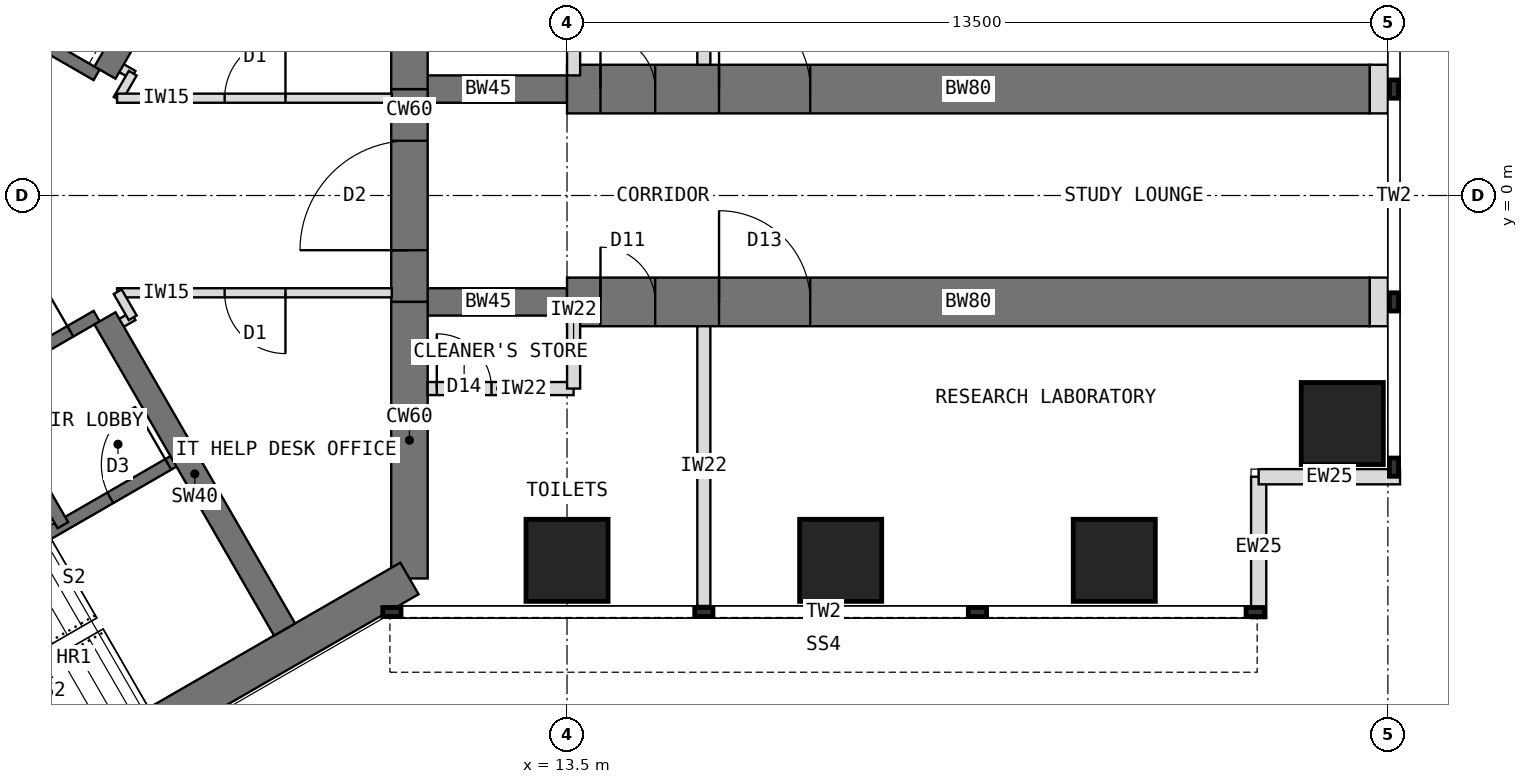
"""IFC4 building model, lengths in metres.
Left out: names, types, materials, properties, quantities, classifications, styles, units other than length and angle.
Written with IfcOpenShell. Run it as: python <this file> out.ifc"""

import sys

from ifc_helpers import new_model, si_unit, direction, frame, frame_2d, origin, origin_2d, place, context, subcontext, project, spatial, rectangle, extrude, element, fill, save


model = new_model("IFC4")
c1 = context("Model", 3, precision=1e-05, world=origin(), true_north=direction((0.0, 1.0)))
c2 = subcontext(c1, "Body", "Model", "MODEL_VIEW")
j1 = project(units=[si_unit("LENGTHUNIT", "METRE"), si_unit("PLANEANGLEUNIT", "RADIAN")], contexts=[c1])
p1 = place(None, origin())
s1 = spatial("IfcSite", under=j1, at=p1, CompositionType="ELEMENT")
p2 = place(p1, origin())
s2 = spatial("IfcBuilding", under=s1, at=p2, CompositionType="ELEMENT")
p3 = place(p2, frame((0.0, 0.0, 101.5)))
s3 = spatial("IfcBuildingStorey", under=s2, at=p3, CompositionType="ELEMENT", Elevation=101.5)
p4 = place(p3, frame((10.908, -6.298, 0.0), z_axis=(0.0, 0.0, 1.0), x_axis=(0.0, 1.0, 0.0)))
e1 = element("IfcWall", 1, at=p4, inside=s3, PredefinedType="SHEAR", context=c2, shape_type="SweptSolid", body=[
    extrude(rectangle(XDim=4.548, YDim=0.6, at=frame_2d((2.274, 0.0))), origin(), (0.0, 0.0, 1.0), 4.0),
])
p5 = place(p3, frame((10.908, -1.75, 0.0), z_axis=(0.0, 0.0, 1.0), x_axis=(0.0, 1.0, 0.0)))
e2 = element("IfcWall", 2, at=p5, inside=s3, PredefinedType="SHEAR", context=c2, shape_type="SweptSolid", body=[
    extrude(rectangle(XDim=3.5, YDim=0.6, at=frame_2d((1.75, 0.0))), origin(), (0.0, 0.0, 1.0), 4.0),
])
p6 = place(p5, frame((0.85, 0.0, 0.0)))
e3 = element("IfcOpeningElement", 3, at=p6, cuts=e2, PredefinedType="OPENING", context=c2, shape_type="SweptSolid", body=[
    extrude(rectangle(XDim=1.8, YDim=2.1, at=frame_2d((0.9, 1.05))), frame((0.0, 0.31, 0.0), z_axis=(0.0, -1.0, 0.0), x_axis=(1.0, 0.0, 0.0)), (0.0, 0.0, 1.0), 0.62),
])
p7 = place(p3, frame((10.908, 1.75, 0.0), z_axis=(0.0, 0.0, 1.0), x_axis=(0.0, 1.0, 0.0)))
e4 = element("IfcWall", 4, at=p7, inside=s3, PredefinedType="SHEAR", context=c2, shape_type="SweptSolid", body=[
    extrude(rectangle(XDim=4.548, YDim=0.6, at=frame_2d((2.274, 0.0))), origin(), (0.0, 0.0, 1.0), 4.0),
])
p8 = place(p3, frame((0.0, -12.596, 0.0), z_axis=(0.0, 0.0, 1.0), x_axis=(0.866021940709, 0.500005998175, 0.0)))
e5 = element("IfcWall", 5, at=p8, inside=s3, PredefinedType="SHEAR", context=c2, shape_type="SweptSolid", body=[
    extrude(rectangle(XDim=12.596, YDim=0.6, at=frame_2d((6.298, 0.0))), origin(), (0.0, 0.0, 1.0), 4.0),
])
p9 = place(p3, frame((10.908, 1.75, 0.0), z_axis=(0.0, 0.0, 1.0), x_axis=(1.0, 0.0, 0.0)))
e6 = element("IfcWall", 6, at=p9, inside=s3, PredefinedType="SHEAR", context=c2, shape_type="SweptSolid", body=[
    extrude(rectangle(XDim=2.592, YDim=0.45, at=frame_2d((1.296, 0.0))), origin(), (0.0, 0.0, 1.0), 4.0),
])
p10 = place(p3, frame((13.5, 1.75, 0.0), z_axis=(0.0, 0.0, 1.0), x_axis=(1.0, 0.0, 0.0)))
e7 = element("IfcWall", 7, at=p10, inside=s3, PredefinedType="SHEAR", context=c2, shape_type="SweptSolid", body=[
    extrude(rectangle(XDim=13.2, YDim=0.8, at=frame_2d((6.6, 0.0))), origin(), (0.0, 0.0, 1.0), 4.0),
])
p11 = place(p10, frame((0.55, 0.0, 0.0)))
e8 = element("IfcOpeningElement", 8, at=p11, cuts=e7, PredefinedType="OPENING", context=c2, shape_type="SweptSolid", body=[
    extrude(rectangle(XDim=0.9, YDim=2.1, at=frame_2d((0.45, 1.05))), frame((0.0, 0.41, 0.0), z_axis=(0.0, -1.0, 0.0), x_axis=(1.0, 0.0, 0.0)), (0.0, 0.0, 1.0), 0.82),
])
p12 = place(p10, frame((2.5, 0.0, 0.0)))
e9 = element("IfcOpeningElement", 9, at=p12, cuts=e7, PredefinedType="OPENING", context=c2, shape_type="SweptSolid", body=[
    extrude(rectangle(XDim=1.5, YDim=2.1, at=frame_2d((0.75, 1.05))), frame((0.0, 0.41, 0.0), z_axis=(0.0, -1.0, 0.0), x_axis=(1.0, 0.0, 0.0)), (0.0, 0.0, 1.0), 0.82),
])
p13 = place(p3, frame((10.908, -1.75, 0.0), z_axis=(0.0, 0.0, 1.0), x_axis=(1.0, 0.0, 0.0)))
e10 = element("IfcWall", 10, at=p13, inside=s3, PredefinedType="SHEAR", context=c2, shape_type="SweptSolid", body=[
    extrude(rectangle(XDim=2.592, YDim=0.45, at=frame_2d((1.296, 0.0))), origin(), (0.0, 0.0, 1.0), 4.0),
])
p14 = place(p3, frame((13.5, -1.75, 0.0), z_axis=(0.0, 0.0, 1.0), x_axis=(1.0, 0.0, 0.0)))
e11 = element("IfcWall", 11, at=p14, inside=s3, PredefinedType="SHEAR", context=c2, shape_type="SweptSolid", body=[
    extrude(rectangle(XDim=13.2, YDim=0.8, at=frame_2d((6.6, 0.0))), origin(), (0.0, 0.0, 1.0), 4.0),
])
p15 = place(p14, frame((0.55, 0.0, 0.0)))
e12 = element("IfcOpeningElement", 12, at=p15, cuts=e11, PredefinedType="OPENING", context=c2, shape_type="SweptSolid", body=[
    extrude(rectangle(XDim=0.9, YDim=2.1, at=frame_2d((0.45, 1.05))), frame((0.0, 0.41, 0.0), z_axis=(0.0, -1.0, 0.0), x_axis=(1.0, 0.0, 0.0)), (0.0, 0.0, 1.0), 0.82),
])
p16 = place(p14, frame((2.5, 0.0, 0.0)))
e13 = element("IfcOpeningElement", 13, at=p16, cuts=e11, PredefinedType="OPENING", context=c2, shape_type="SweptSolid", body=[
    extrude(rectangle(XDim=1.5, YDim=2.1, at=frame_2d((0.75, 1.05))), frame((0.0, 0.41, 0.0), z_axis=(0.0, -1.0, 0.0), x_axis=(1.0, 0.0, 0.0)), (0.0, 0.0, 1.0), 0.82),
])
for number, where, z_axis, x_axis in (
    (14, (13.5, -6.0, 0.0), (0.0, 0.0, 1.0), (1.0, 0.0, 0.0)),
    (15, (18.0, -6.0, 0.0), (0.0, 0.0, 1.0), (1.0, 0.0, 0.0)),
    (16, (22.5, -6.0, 0.0), (0.0, 0.0, 1.0), (1.0, 0.0, 0.0)),
    (17, (26.25, -3.75, 0.0), (0.0, 0.0, 1.0), (1.0, 0.0, 0.0)),
):
    element("IfcColumn", number, at=place(p3, frame(where, z_axis=z_axis, x_axis=x_axis)), inside=s3, PredefinedType="COLUMN", context=c2, shape_type="SweptSolid", body=[
        extrude(rectangle(XDim=1.35, YDim=1.35, at=origin_2d()), origin(), (0.0, 0.0, 1.0), 4.0),
    ])
for number, where, z_axis, x_axis in (
    (18, (24.875, -6.95, 0.0), (0.0, 0.0, 1.0), (0.0, 1.0, 0.0)),
    (19, (24.875, -4.625, 0.0), (0.0, 0.0, 1.0), (1.0, 0.0, 0.0)),
):
    element("IfcWall", number, at=place(p3, frame(where, z_axis=z_axis, x_axis=x_axis)), inside=s3, PredefinedType="STANDARD", context=c2, shape_type="SweptSolid", body=[
        extrude(rectangle(XDim=2.325, YDim=0.25, at=frame_2d((1.163, 0.0))), origin(), (0.0, 0.0, 1.0), 3.8),
    ])
for number, where, z_axis, x_axis in (
    (20, (26.7, 1.75, 0.0), (0.0, 0.0, 1.0), (1.0, 0.0, 0.0)),
    (21, (26.7, -1.75, 0.0), (0.0, 0.0, 1.0), (1.0, 0.0, 0.0)),
):
    element("IfcWall", number, at=place(p3, frame(where, z_axis=z_axis, x_axis=x_axis)), inside=s3, PredefinedType="PARTITIONING", context=c2, shape_type="SweptSolid", body=[
        extrude(rectangle(XDim=0.3, YDim=0.8, at=frame_2d((0.15, 0.0))), origin(), (0.0, 0.0, 1.0), 3.8),
    ])
p17 = place(p3, frame((5.764, 1.984, 0.0), z_axis=(0.0, 0.0, 1.0), x_axis=(-0.866026010844, 0.49999894854, 0.0)))
e22 = element("IfcWall", 22, at=p17, inside=s3, PredefinedType="SHEAR", context=c2, shape_type="SweptSolid", body=[
    extrude(rectangle(XDim=8.0, YDim=0.2, at=frame_2d((4.0, 0.0))), origin(), (0.0, 0.0, 1.0), 4.0),
])
p18 = place(p17, frame((6.3, 0.0, 0.0)))
e23 = element("IfcOpeningElement", 23, at=p18, cuts=e22, PredefinedType="OPENING", context=c2, shape_type="SweptSolid", body=[
    extrude(rectangle(XDim=1.2, YDim=2.1, at=frame_2d((0.6, 1.05))), frame((0.0, 0.11, 0.0), z_axis=(0.0, -1.0, 0.0), x_axis=(1.0, 0.0, 0.0)), (0.0, 0.0, 1.0), 0.22),
])
p19 = place(p3, frame((5.901, 2.02, 0.0), z_axis=(0.0, 0.0, 1.0), x_axis=(0.500027676417, 0.866009424208, 0.0)))
e24 = element("IfcWall", 24, at=p19, inside=s3, PredefinedType="SHEAR", context=c2, shape_type="SweptSolid", body=[
    extrude(rectangle(XDim=5.908, YDim=0.4, at=frame_2d((2.954, 0.0))), origin(), (0.0, 0.0, 1.0), 4.0),
])
p20 = place(p3, frame((-1.164, -5.984, 0.0), z_axis=(0.0, 0.0, 1.0), x_axis=(0.866026010844, 0.49999894854, 0.0)))
e25 = element("IfcWall", 25, at=p20, inside=s3, PredefinedType="SHEAR", context=c2, shape_type="SweptSolid", body=[
    extrude(rectangle(XDim=8.0, YDim=0.2, at=frame_2d((4.0, 0.0))), origin(), (0.0, 0.0, 1.0), 4.0),
])
p21 = place(p20, frame((6.3, 0.0, 0.0)))
e26 = element("IfcOpeningElement", 26, at=p21, cuts=e25, PredefinedType="OPENING", context=c2, shape_type="SweptSolid", body=[
    extrude(rectangle(XDim=1.2, YDim=2.1, at=frame_2d((0.6, 1.05))), frame((0.0, 0.11, 0.0), z_axis=(0.0, -1.0, 0.0), x_axis=(1.0, 0.0, 0.0)), (0.0, 0.0, 1.0), 0.22),
])
p22 = place(p20, frame((0.9, 0.0, 0.0)))
e27 = element("IfcOpeningElement", 27, at=p22, cuts=e25, PredefinedType="OPENING", context=c2, shape_type="SweptSolid", body=[
    extrude(rectangle(XDim=1.1, YDim=2.2, at=frame_2d((0.55, 1.1))), frame((0.0, 0.11, 0.0), z_axis=(0.0, -1.0, 0.0), x_axis=(1.0, 0.0, 0.0)), (0.0, 0.0, 1.0), 0.22),
])
p23 = place(p20, frame((3.8, 0.0, 0.0)))
e28 = element("IfcOpeningElement", 28, at=p23, cuts=e25, PredefinedType="OPENING", context=c2, shape_type="SweptSolid", body=[
    extrude(rectangle(XDim=1.1, YDim=2.2, at=frame_2d((0.55, 1.1))), frame((0.0, 0.11, 0.0), z_axis=(0.0, -1.0, 0.0), x_axis=(1.0, 0.0, 0.0)), (0.0, 0.0, 1.0), 0.22),
])
p24 = place(p3, frame((3.909, -3.17, 0.0), z_axis=(0.0, 0.0, 1.0), x_axis=(0.49997716683, -0.86603858612, 0.0)))
e29 = element("IfcWall", 29, at=p24, inside=s3, PredefinedType="SHEAR", context=c2, shape_type="SweptSolid", body=[
    extrude(rectangle(XDim=2.6, YDim=0.2, at=frame_2d((1.3, 0.0))), origin(), (0.0, 0.0, 1.0), 4.0),
])
p25 = place(p3, frame((0.186, -8.322, 0.0), z_axis=(0.0, 0.0, 1.0), x_axis=(0.866026010844, 0.49999894854, 0.0)))
e30 = element("IfcWall", 30, at=p25, inside=s3, PredefinedType="SHEAR", context=c2, shape_type="SweptSolid", body=[
    extrude(rectangle(XDim=8.0, YDim=0.2, at=frame_2d((4.0, 0.0))), origin(), (0.0, 0.0, 1.0), 4.0),
])
p26 = place(p25, frame((6.7, 0.0, 0.0)))
e31 = element("IfcOpeningElement", 31, at=p26, cuts=e30, PredefinedType="OPENING", context=c2, shape_type="SweptSolid", body=[
    extrude(rectangle(XDim=1.1, YDim=2.1, at=frame_2d((0.55, 1.05))), frame((0.0, 0.11, 0.0), z_axis=(0.0, -1.0, 0.0), x_axis=(1.0, 0.0, 0.0)), (0.0, 0.0, 1.0), 0.22),
])
p27 = place(p3, frame((5.901, -2.02, 0.0), z_axis=(0.0, 0.0, 1.0), x_axis=(0.500027676417, -0.866009424208, 0.0)))
e32 = element("IfcWall", 32, at=p27, inside=s3, PredefinedType="SHEAR", context=c2, shape_type="SweptSolid", body=[
    extrude(rectangle(XDim=5.908, YDim=0.4, at=frame_2d((2.954, 0.0))), origin(), (0.0, 0.0, 1.0), 4.0),
])
p28 = place(p3, frame((15.75, 2.15, 0.0), z_axis=(0.0, 0.0, 1.0), x_axis=(0.0, 1.0, 0.0)))
e33 = element("IfcWall", 33, at=p28, inside=s3, PredefinedType="PARTITIONING", context=c2, shape_type="SweptSolid", body=[
    extrude(rectangle(XDim=4.6, YDim=0.215, at=frame_2d((2.3, 0.0))), origin(), (0.0, 0.0, 1.0), 3.8),
])
p29 = place(p3, frame((13.608, 1.975, 0.0), z_axis=(0.0, 0.0, 1.0), x_axis=(0.0, 1.0, 0.0)))
e34 = element("IfcWall", 34, at=p29, inside=s3, PredefinedType="PARTITIONING", context=c2, shape_type="SweptSolid", body=[
    extrude(rectangle(XDim=3.2, YDim=0.215, at=frame_2d((1.6, 0.0))), origin(), (0.0, 0.0, 1.0), 3.8),
])
p30 = place(p3, frame((15.75, -2.15, 0.0), z_axis=(0.0, 0.0, 1.0), x_axis=(0.0, -1.0, 0.0)))
e35 = element("IfcWall", 35, at=p30, inside=s3, PredefinedType="PARTITIONING", context=c2, shape_type="SweptSolid", body=[
    extrude(rectangle(XDim=4.6, YDim=0.215, at=frame_2d((2.3, 0.0))), origin(), (0.0, 0.0, 1.0), 3.8),
])
p31 = place(p3, frame((11.208, -3.175, 0.0), z_axis=(0.0, 0.0, 1.0), x_axis=(1.0, 0.0, 0.0)))
e36 = element("IfcWall", 36, at=p31, inside=s3, PredefinedType="PARTITIONING", context=c2, shape_type="SweptSolid", body=[
    extrude(rectangle(XDim=2.4, YDim=0.215, at=frame_2d((1.2, 0.0))), origin(), (0.0, 0.0, 1.0), 3.8),
])
p32 = place(p31, frame((0.15, 0.0, 0.0)))
e37 = element("IfcOpeningElement", 37, at=p32, cuts=e36, PredefinedType="OPENING", context=c2, shape_type="SweptSolid", body=[
    extrude(rectangle(XDim=0.9, YDim=2.1, at=frame_2d((0.45, 1.05))), frame((0.0, 0.117, 0.0), z_axis=(0.0, -1.0, 0.0), x_axis=(1.0, 0.0, 0.0)), (0.0, 0.0, 1.0), 0.235),
])
p33 = place(p3, frame((13.608, -1.975, 0.0), z_axis=(0.0, 0.0, 1.0), x_axis=(0.0, -1.0, 0.0)))
e38 = element("IfcWall", 38, at=p33, inside=s3, PredefinedType="PARTITIONING", context=c2, shape_type="SweptSolid", body=[
    extrude(rectangle(XDim=1.2, YDim=0.215, at=frame_2d((0.6, 0.0))), origin(), (0.0, 0.0, 1.0), 3.8),
])
for number, where, z_axis, x_axis in (
    (39, (6.365, -1.983, 0.0), (0.0, 0.0, 1.0), (-0.866, -0.5, 0.0)),
    (40, (5.992, 2.198, 0.0), (0.0, 0.0, 1.0), (0.866, -0.5, 0.0)),
):
    element("IfcWall", number, at=place(p3, frame(where, z_axis=z_axis, x_axis=x_axis)), inside=s3, PredefinedType="PARTITIONING", context=c2, shape_type="SweptSolid", body=[
        extrude(rectangle(XDim=0.43, YDim=0.15, at=frame_2d((0.215, 0.0))), origin(), (0.0, 0.0, 1.0), 3.8),
    ])
p34 = place(p3, frame((6.357, 2.011, 0.0), z_axis=(0.0, 0.0, 1.0), x_axis=(-0.50033519877, -0.865831790172, 0.0)))
e41 = element("IfcWall", 41, at=p34, inside=s3, PredefinedType="PARTITIONING", context=c2, shape_type="SweptSolid", body=[
    extrude(rectangle(XDim=0.494, YDim=0.15, at=frame_2d((0.247, 0.0))), origin(), (0.0, 0.0, 1.0), 3.8),
])
p35 = place(p3, frame((6.1, 1.6, 0.0), z_axis=(0.0, 0.0, 1.0), x_axis=(1.0, 0.0, 0.0)))
e42 = element("IfcWall", 42, at=p35, inside=s3, PredefinedType="PARTITIONING", context=c2, shape_type="SweptSolid", body=[
    extrude(rectangle(XDim=4.519, YDim=0.15, at=frame_2d((2.259, 0.0))), origin(), (0.0, 0.0, 1.0), 3.8),
])
p36 = place(p35, frame((1.769, 0.0, 0.0)))
e43 = element("IfcOpeningElement", 43, at=p36, cuts=e42, PredefinedType="OPENING", context=c2, shape_type="SweptSolid", body=[
    extrude(rectangle(XDim=1.0, YDim=2.1, at=frame_2d((0.5, 1.05))), frame((0.0, 0.085, 0.0), z_axis=(0.0, -1.0, 0.0), x_axis=(1.0, 0.0, 0.0)), (0.0, 0.0, 1.0), 0.17),
])
p37 = place(p3, frame((10.618, -1.6, 0.0), z_axis=(0.0, 0.0, 1.0), x_axis=(-1.0, 0.0, 0.0)))
e44 = element("IfcWall", 44, at=p37, inside=s3, PredefinedType="PARTITIONING", context=c2, shape_type="SweptSolid", body=[
    extrude(rectangle(XDim=4.519, YDim=0.15, at=frame_2d((2.259, 0.0))), origin(), (0.0, 0.0, 1.0), 3.8),
])
p38 = place(p37, frame((1.749, 0.0, 0.0)))
e45 = element("IfcOpeningElement", 45, at=p38, cuts=e44, PredefinedType="OPENING", context=c2, shape_type="SweptSolid", body=[
    extrude(rectangle(XDim=1.0, YDim=2.1, at=frame_2d((0.5, 1.05))), frame((0.0, 0.085, 0.0), z_axis=(0.0, -1.0, 0.0), x_axis=(1.0, 0.0, 0.0)), (0.0, 0.0, 1.0), 0.17),
])
p39 = place(p3, frame((6.11, -1.583, 0.0), z_axis=(0.0, 0.0, 1.0), x_axis=(0.50033519877, -0.865831790172, 0.0)))
e46 = element("IfcWall", 46, at=p39, inside=s3, PredefinedType="PARTITIONING", context=c2, shape_type="SweptSolid", body=[
    extrude(rectangle(XDim=0.494, YDim=0.15, at=frame_2d((0.247, 0.0))), origin(), (0.0, 0.0, 1.0), 3.8),
])
p40 = place(p21, origin())
e47 = element("IfcDoor", 47, at=p40, inside=s3, OperationType="SINGLE_SWING_RIGHT", PredefinedType="DOOR", context=c2, shape_type="SweptSolid", body=[
    extrude(rectangle(XDim=1.2, YDim=2.1, at=frame_2d((0.6, 1.05))), frame((0.0, 0.025, 0.0), z_axis=(0.0, -1.0, 0.0), x_axis=(1.0, 0.0, 0.0)), (0.0, 0.0, 1.0), 0.05),
])
fill(e26, e47)
p41 = place(p26, origin())
e48 = element("IfcDoor", 48, at=p41, inside=s3, OperationType="SINGLE_SWING_RIGHT", PredefinedType="DOOR", context=c2, shape_type="SweptSolid", body=[
    extrude(rectangle(XDim=1.1, YDim=2.1, at=frame_2d((0.55, 1.05))), frame((0.0, 0.025, 0.0), z_axis=(0.0, -1.0, 0.0), x_axis=(1.0, 0.0, 0.0)), (0.0, 0.0, 1.0), 0.05),
])
fill(e31, e48)
p42 = place(p6, origin())
e49 = element("IfcDoor", 49, at=p42, inside=s3, OperationType="DOUBLE_DOOR_DOUBLE_SWING", PredefinedType="DOOR", context=c2, shape_type="SweptSolid", body=[
    extrude(rectangle(XDim=1.72, YDim=2.06, at=frame_2d((0.9, 1.03))), frame((0.0, 0.025, 0.0), z_axis=(0.0, -1.0, 0.0), x_axis=(1.0, 0.0, 0.0)), (0.0, 0.0, 1.0), 0.05),
    extrude(rectangle(XDim=0.04, YDim=2.1, at=frame_2d((0.02, 1.05))), frame((0.0, 0.3, 0.0), z_axis=(0.0, -1.0, 0.0), x_axis=(1.0, 0.0, 0.0)), (0.0, 0.0, 1.0), 0.6),
    extrude(rectangle(XDim=0.04, YDim=2.1, at=frame_2d((1.78, 1.05))), frame((0.0, 0.3, 0.0), z_axis=(0.0, -1.0, 0.0), x_axis=(1.0, 0.0, 0.0)), (0.0, 0.0, 1.0), 0.6),
    extrude(rectangle(XDim=1.72, YDim=0.04, at=frame_2d((0.9, 2.08))), frame((0.0, 0.3, 0.0), z_axis=(0.0, -1.0, 0.0), x_axis=(1.0, 0.0, 0.0)), (0.0, 0.0, 1.0), 0.6),
])
fill(e3, e49)
p43 = place(p32, origin())
e50 = element("IfcDoor", 50, at=p43, inside=s3, OperationType="SINGLE_SWING_LEFT", PredefinedType="DOOR", context=c2, shape_type="SweptSolid", body=[
    extrude(rectangle(XDim=0.9, YDim=2.1, at=frame_2d((0.45, 1.05))), frame((0.0, 0.025, 0.0), z_axis=(0.0, -1.0, 0.0), x_axis=(1.0, 0.0, 0.0)), (0.0, 0.0, 1.0), 0.05),
])
fill(e37, e50)
p44 = place(p38, origin())
e51 = element("IfcDoor", 51, at=p44, inside=s3, OperationType="SINGLE_SWING_LEFT", PredefinedType="DOOR", context=c2, shape_type="SweptSolid", body=[
    extrude(rectangle(XDim=1.0, YDim=2.1, at=frame_2d((0.5, 1.05))), frame((0.0, 0.025, 0.0), z_axis=(0.0, -1.0, 0.0), x_axis=(1.0, 0.0, 0.0)), (0.0, 0.0, 1.0), 0.05),
])
fill(e45, e51)
p45 = place(p36, origin())
e52 = element("IfcDoor", 52, at=p45, inside=s3, OperationType="SINGLE_SWING_RIGHT", PredefinedType="DOOR", context=c2, shape_type="SweptSolid", body=[
    extrude(rectangle(XDim=1.0, YDim=2.1, at=frame_2d((0.5, 1.05))), frame((0.0, 0.025, 0.0), z_axis=(0.0, -1.0, 0.0), x_axis=(1.0, 0.0, 0.0)), (0.0, 0.0, 1.0), 0.05),
])
fill(e43, e52)
p46 = place(p11, origin())
e53 = element("IfcDoor", 53, at=p46, inside=s3, OperationType="SINGLE_SWING_LEFT", PredefinedType="DOOR", context=c2, shape_type="SweptSolid", body=[
    extrude(rectangle(XDim=0.82, YDim=2.06, at=frame_2d((0.45, 1.03))), frame((0.0, 0.025, 0.0), z_axis=(0.0, -1.0, 0.0), x_axis=(1.0, 0.0, 0.0)), (0.0, 0.0, 1.0), 0.05),
    extrude(rectangle(XDim=0.04, YDim=2.1, at=frame_2d((0.02, 1.05))), frame((0.0, 0.4, 0.0), z_axis=(0.0, -1.0, 0.0), x_axis=(1.0, 0.0, 0.0)), (0.0, 0.0, 1.0), 0.8),
    extrude(rectangle(XDim=0.04, YDim=2.1, at=frame_2d((0.88, 1.05))), frame((0.0, 0.4, 0.0), z_axis=(0.0, -1.0, 0.0), x_axis=(1.0, 0.0, 0.0)), (0.0, 0.0, 1.0), 0.8),
    extrude(rectangle(XDim=0.82, YDim=0.04, at=frame_2d((0.45, 2.08))), frame((0.0, 0.4, 0.0), z_axis=(0.0, -1.0, 0.0), x_axis=(1.0, 0.0, 0.0)), (0.0, 0.0, 1.0), 0.8),
])
fill(e8, e53)
p47 = place(p12, origin())
e54 = element("IfcDoor", 54, at=p47, inside=s3, OperationType="DOUBLE_DOOR_SINGLE_SWING", PredefinedType="DOOR", context=c2, shape_type="SweptSolid", body=[
    extrude(rectangle(XDim=1.42, YDim=2.06, at=frame_2d((0.75, 1.03))), frame((0.0, 0.025, 0.0), z_axis=(0.0, -1.0, 0.0), x_axis=(1.0, 0.0, 0.0)), (0.0, 0.0, 1.0), 0.05),
    extrude(rectangle(XDim=0.04, YDim=2.1, at=frame_2d((0.02, 1.05))), frame((0.0, 0.4, 0.0), z_axis=(0.0, -1.0, 0.0), x_axis=(1.0, 0.0, 0.0)), (0.0, 0.0, 1.0), 0.8),
    extrude(rectangle(XDim=0.04, YDim=2.1, at=frame_2d((1.48, 1.05))), frame((0.0, 0.4, 0.0), z_axis=(0.0, -1.0, 0.0), x_axis=(1.0, 0.0, 0.0)), (0.0, 0.0, 1.0), 0.8),
    extrude(rectangle(XDim=1.42, YDim=0.04, at=frame_2d((0.75, 2.08))), frame((0.0, 0.4, 0.0), z_axis=(0.0, -1.0, 0.0), x_axis=(1.0, 0.0, 0.0)), (0.0, 0.0, 1.0), 0.8),
])
fill(e9, e54)
p48 = place(p15, origin())
e55 = element("IfcDoor", 55, at=p48, inside=s3, OperationType="SINGLE_SWING_LEFT", PredefinedType="DOOR", context=c2, shape_type="SweptSolid", body=[
    extrude(rectangle(XDim=0.82, YDim=2.06, at=frame_2d((0.45, 1.03))), frame((0.0, 0.025, 0.0), z_axis=(0.0, -1.0, 0.0), x_axis=(1.0, 0.0, 0.0)), (0.0, 0.0, 1.0), 0.05),
    extrude(rectangle(XDim=0.04, YDim=2.1, at=frame_2d((0.02, 1.05))), frame((0.0, 0.4, 0.0), z_axis=(0.0, -1.0, 0.0), x_axis=(1.0, 0.0, 0.0)), (0.0, 0.0, 1.0), 0.8),
    extrude(rectangle(XDim=0.04, YDim=2.1, at=frame_2d((0.88, 1.05))), frame((0.0, 0.4, 0.0), z_axis=(0.0, -1.0, 0.0), x_axis=(1.0, 0.0, 0.0)), (0.0, 0.0, 1.0), 0.8),
    extrude(rectangle(XDim=0.82, YDim=0.04, at=frame_2d((0.45, 2.08))), frame((0.0, 0.4, 0.0), z_axis=(0.0, -1.0, 0.0), x_axis=(1.0, 0.0, 0.0)), (0.0, 0.0, 1.0), 0.8),
])
fill(e12, e55)
p49 = place(p16, origin())
e56 = element("IfcDoor", 56, at=p49, inside=s3, OperationType="DOUBLE_DOOR_SINGLE_SWING", PredefinedType="DOOR", context=c2, shape_type="SweptSolid", body=[
    extrude(rectangle(XDim=1.42, YDim=2.06, at=frame_2d((0.75, 1.03))), frame((0.0, 0.025, 0.0), z_axis=(0.0, -1.0, 0.0), x_axis=(1.0, 0.0, 0.0)), (0.0, 0.0, 1.0), 0.05),
    extrude(rectangle(XDim=0.04, YDim=2.1, at=frame_2d((0.02, 1.05))), frame((0.0, 0.4, 0.0), z_axis=(0.0, -1.0, 0.0), x_axis=(1.0, 0.0, 0.0)), (0.0, 0.0, 1.0), 0.8),
    extrude(rectangle(XDim=0.04, YDim=2.1, at=frame_2d((1.48, 1.05))), frame((0.0, 0.4, 0.0), z_axis=(0.0, -1.0, 0.0), x_axis=(1.0, 0.0, 0.0)), (0.0, 0.0, 1.0), 0.8),
    extrude(rectangle(XDim=1.42, YDim=0.04, at=frame_2d((0.75, 2.08))), frame((0.0, 0.4, 0.0), z_axis=(0.0, -1.0, 0.0), x_axis=(1.0, 0.0, 0.0)), (0.0, 0.0, 1.0), 0.8),
])
fill(e13, e56)
save(model, sys.argv[1])
